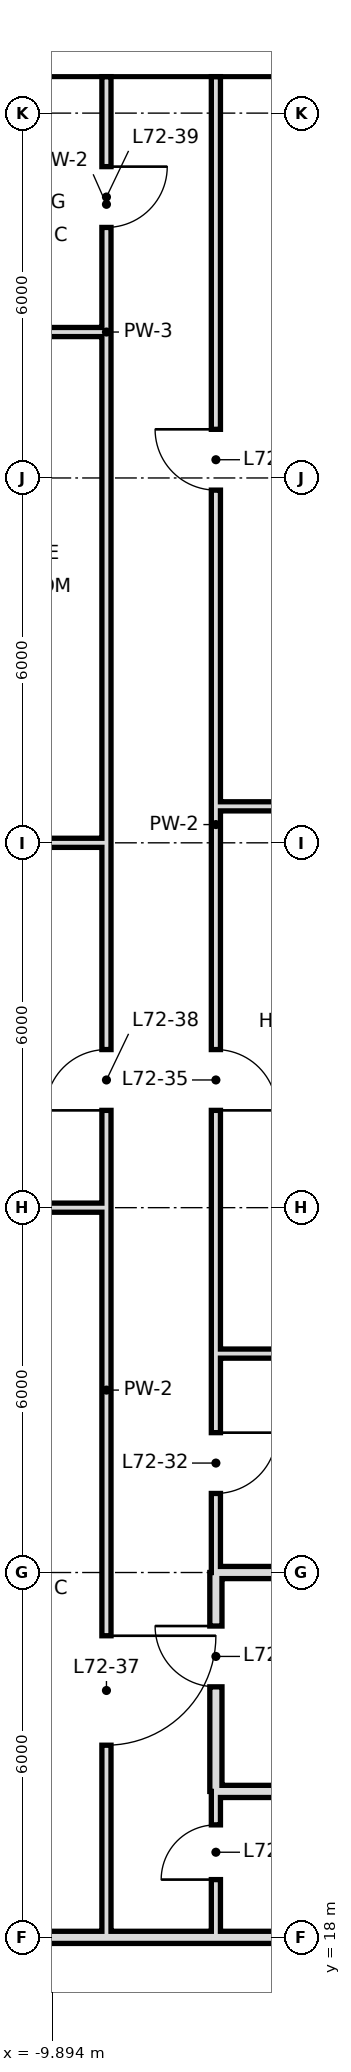
"""IFC4 building model, lengths in metres.
Left out: names, types, materials, properties, quantities, classifications, styles, units other than length and angle.
Written with IfcOpenShell. Run it as: python <this file> out.ifc"""

import sys

from ifc_helpers import new_model, si_unit, direction, frame, frame_2d, origin, place, context, subcontext, project, spatial, rectangle, extrude, element, fill, save


model = new_model("IFC4")
c1 = context("Model", 3, precision=1e-05, world=origin(), true_north=direction((0.0, 1.0)))
c2 = subcontext(c1, "Body", "Model", "MODEL_VIEW")
j1 = project(units=[si_unit("LENGTHUNIT", "METRE"), si_unit("PLANEANGLEUNIT", "RADIAN")], contexts=[c1])
p1 = place(None, origin())
s1 = spatial("IfcSite", under=j1, at=p1, CompositionType="ELEMENT")
p2 = place(p1, origin())
s2 = spatial("IfcBuilding", under=s1, at=p2, CompositionType="ELEMENT")
p3 = place(p2, frame((0.0, 0.0, 305.2)))
s3 = spatial("IfcBuildingStorey", under=s2, at=p3, CompositionType="ELEMENT", Elevation=305.2)
p4 = place(p3, frame((-7.2, 20.4, 0.0), z_axis=(0.0, 0.0, 1.0), x_axis=(0.0, 1.0, 0.0)))
e1 = element("IfcWall", 1, at=p4, inside=s3, PredefinedType="SOLIDWALL", context=c2, shape_type="SweptSolid", body=[
    extrude(rectangle(XDim=3.6, YDim=0.2, at=frame_2d((1.8, 0.0))), origin(), (0.0, 0.0, 1.0), 2.72),
])
p5 = place(p4, frame((1.72, 0.0, 0.0)))
e2 = element("IfcOpeningElement", 2, at=p5, cuts=e1, PredefinedType="OPENING", context=c2, shape_type="SweptSolid", body=[
    extrude(rectangle(XDim=1.0, YDim=2.4, at=frame_2d((0.5, 1.2))), frame((0.0, 0.11, 0.0), z_axis=(0.0, -1.0, 0.0), x_axis=(1.0, 0.0, 0.0)), (0.0, 0.0, 1.0), 0.22),
])
p6 = place(p3, frame((-7.2, 24.0, 0.0), z_axis=(0.0, 0.0, 1.0), x_axis=(0.0, 1.0, 0.0)))
e3 = element("IfcWall", 3, at=p6, inside=s3, PredefinedType="PARTITIONING", context=c2, shape_type="SweptSolid", body=[
    extrude(rectangle(XDim=24.6, YDim=0.15, at=frame_2d((12.3, 0.0))), origin(), (0.0, 0.0, 1.0), 3.42),
])
p7 = place(p6, frame((1.3, 0.0, 0.0)))
e4 = element("IfcOpeningElement", 4, at=p7, cuts=e3, PredefinedType="OPENING", context=c2, shape_type="SweptSolid", body=[
    extrude(rectangle(XDim=1.0, YDim=2.4, at=frame_2d((0.5, 1.2))), frame((0.0, 0.085, 0.0), z_axis=(0.0, -1.0, 0.0), x_axis=(1.0, 0.0, 0.0)), (0.0, 0.0, 1.0), 0.17),
])
p8 = place(p6, frame((7.6, 0.0, 0.0)))
e5 = element("IfcOpeningElement", 5, at=p8, cuts=e3, PredefinedType="OPENING", context=c2, shape_type="SweptSolid", body=[
    extrude(rectangle(XDim=1.0, YDim=2.4, at=frame_2d((0.5, 1.2))), frame((0.0, 0.085, 0.0), z_axis=(0.0, -1.0, 0.0), x_axis=(1.0, 0.0, 0.0)), (0.0, 0.0, 1.0), 0.17),
])
p9 = place(p6, frame((17.8, 0.0, 0.0)))
e6 = element("IfcOpeningElement", 6, at=p9, cuts=e3, PredefinedType="OPENING", context=c2, shape_type="SweptSolid", body=[
    extrude(rectangle(XDim=1.0, YDim=2.4, at=frame_2d((0.5, 1.2))), frame((0.0, 0.085, 0.0), z_axis=(0.0, -1.0, 0.0), x_axis=(1.0, 0.0, 0.0)), (0.0, 0.0, 1.0), 0.17),
])
p10 = place(p3, frame((-7.2, 18.0, 0.0), z_axis=(0.0, 0.0, 1.0), x_axis=(0.0, 1.0, 0.0)))
e7 = element("IfcWall", 7, at=p10, inside=s3, PredefinedType="PARTITIONING", context=c2, shape_type="SweptSolid", body=[
    extrude(rectangle(XDim=2.4, YDim=0.15, at=frame_2d((1.2, 0.0))), origin(), (0.0, 0.0, 1.0), 3.42),
])
p11 = place(p10, frame((0.95, 0.0, 0.0)))
e8 = element("IfcOpeningElement", 8, at=p11, cuts=e7, PredefinedType="OPENING", context=c2, shape_type="SweptSolid", body=[
    extrude(rectangle(XDim=0.9, YDim=2.4, at=frame_2d((0.45, 1.2))), frame((0.0, 0.085, 0.0), z_axis=(0.0, -1.0, 0.0), x_axis=(1.0, 0.0, 0.0)), (0.0, 0.0, 1.0), 0.17),
])
p12 = place(p3, frame((-9.0, 18.0, 0.0), z_axis=(0.0, 0.0, 1.0), x_axis=(0.0, 1.0, 0.0)))
e9 = element("IfcWall", 9, at=p12, inside=s3, PredefinedType="PARTITIONING", context=c2, shape_type="SweptSolid", body=[
    extrude(rectangle(XDim=18.0, YDim=0.15, at=frame_2d((9.0, 0.0))), origin(), (0.0, 0.0, 1.0), 3.42),
])
p13 = place(p12, frame((3.16, 0.0, 0.0)))
e10 = element("IfcOpeningElement", 10, at=p13, cuts=e9, PredefinedType="OPENING", context=c2, shape_type="SweptSolid", body=[
    extrude(rectangle(XDim=1.8, YDim=2.4, at=frame_2d((0.9, 1.2))), frame((0.0, 0.085, 0.0), z_axis=(0.0, -1.0, 0.0), x_axis=(1.0, 0.0, 0.0)), (0.0, 0.0, 1.0), 0.17),
])
p14 = place(p12, frame((13.6, 0.0, 0.0)))
e11 = element("IfcOpeningElement", 11, at=p14, cuts=e9, PredefinedType="OPENING", context=c2, shape_type="SweptSolid", body=[
    extrude(rectangle(XDim=1.0, YDim=2.4, at=frame_2d((0.5, 1.2))), frame((0.0, 0.085, 0.0), z_axis=(0.0, -1.0, 0.0), x_axis=(1.0, 0.0, 0.0)), (0.0, 0.0, 1.0), 0.17),
])
p15 = place(p3, frame((-9.0, 44.4, 0.0), z_axis=(0.0, 0.0, 1.0), x_axis=(0.0, 1.0, 0.0)))
e12 = element("IfcWall", 12, at=p15, inside=s3, PredefinedType="PARTITIONING", context=c2, shape_type="SweptSolid", body=[
    extrude(rectangle(XDim=4.2, YDim=0.15, at=frame_2d((2.1, 0.0))), origin(), (0.0, 0.0, 1.0), 3.42),
])
p16 = place(p15, frame((1.72, 0.0, 0.0)))
e13 = element("IfcOpeningElement", 13, at=p16, cuts=e12, PredefinedType="OPENING", context=c2, shape_type="SweptSolid", body=[
    extrude(rectangle(XDim=1.0, YDim=2.4, at=frame_2d((0.5, 1.2))), frame((0.0, 0.085, 0.0), z_axis=(0.0, -1.0, 0.0), x_axis=(1.0, 0.0, 0.0)), (0.0, 0.0, 1.0), 0.17),
])
p17 = place(p3, frame((-9.0, 36.0, 0.0), z_axis=(0.0, 0.0, 1.0), x_axis=(0.0, 1.0, 0.0)))
e14 = element("IfcWall", 14, at=p17, inside=s3, PredefinedType="PARTITIONING", context=c2, shape_type="SweptSolid", body=[
    extrude(rectangle(XDim=8.4, YDim=0.15, at=frame_2d((4.2, 0.0))), origin(), (0.0, 0.0, 1.0), 3.42),
])
p18 = place(p3, frame((-12.6, 18.0, 0.0), z_axis=(0.0, 0.0, 1.0), x_axis=(1.0, 0.0, 0.0)))
e15 = element("IfcWall", 15, at=p18, inside=s3, PredefinedType="SOLIDWALL", context=c2, shape_type="SweptSolid", body=[
    extrude(rectangle(XDim=15.7, YDim=0.2, at=frame_2d((7.85, 0.0))), origin(), (0.0, 0.0, 1.0), 2.72),
])
for number, where, z_axis, x_axis in (
    (16, (-7.2, 20.4, 0.0), (0.0, 0.0, 1.0), (1.0, 0.0, 0.0)),
    (17, (-7.2, 24.0, 0.0), (0.0, 0.0, 1.0), (1.0, 0.0, 0.0)),
):
    element("IfcWall", number, at=place(p3, frame(where, z_axis=z_axis, x_axis=x_axis)), inside=s3, PredefinedType="SOLIDWALL", context=c2, shape_type="SweptSolid", body=[
        extrude(rectangle(XDim=10.3, YDim=0.2, at=frame_2d((5.15, 0.0))), origin(), (0.0, 0.0, 1.0), 2.72),
    ])
p19 = place(p3, frame((-7.2, 27.6, 0.0), z_axis=(0.0, 0.0, 1.0), x_axis=(1.0, 0.0, 0.0)))
e18 = element("IfcWall", 18, at=p19, inside=s3, PredefinedType="PARTITIONING", context=c2, shape_type="SweptSolid", body=[
    extrude(rectangle(XDim=10.3, YDim=0.15, at=frame_2d((5.15, 0.0))), origin(), (0.0, 0.0, 1.0), 3.42),
])
p20 = place(p3, frame((-18.6, 30.0, 0.0), z_axis=(0.0, 0.0, 1.0), x_axis=(1.0, 0.0, 0.0)))
e19 = element("IfcWall", 19, at=p20, inside=s3, PredefinedType="PARTITIONING", context=c2, shape_type="SweptSolid", body=[
    extrude(rectangle(XDim=9.6, YDim=0.15, at=frame_2d((4.8, 0.0))), origin(), (0.0, 0.0, 1.0), 2.72),
])
p21 = place(p3, frame((-12.0, 36.0, 0.0), z_axis=(0.0, 0.0, 1.0), x_axis=(1.0, 0.0, 0.0)))
e20 = element("IfcWall", 20, at=p21, inside=s3, PredefinedType="PARTITIONING", context=c2, shape_type="SweptSolid", body=[
    extrude(rectangle(XDim=3.0, YDim=0.15, at=frame_2d((1.5, 0.0))), origin(), (0.0, 0.0, 1.0), 2.72),
])
p22 = place(p3, frame((-7.2, 36.6, 0.0), z_axis=(0.0, 0.0, 1.0), x_axis=(1.0, 0.0, 0.0)))
e21 = element("IfcWall", 21, at=p22, inside=s3, PredefinedType="PARTITIONING", context=c2, shape_type="SweptSolid", body=[
    extrude(rectangle(XDim=10.3, YDim=0.15, at=frame_2d((5.15, 0.0))), origin(), (0.0, 0.0, 1.0), 3.42),
])
p23 = place(p3, frame((-12.0, 44.4, 0.0), z_axis=(0.0, 0.0, 1.0), x_axis=(1.0, 0.0, 0.0)))
e22 = element("IfcWall", 22, at=p23, inside=s3, PredefinedType="PARTITIONING", context=c2, shape_type="SweptSolid", body=[
    extrude(rectangle(XDim=3.0, YDim=0.15, at=frame_2d((1.5, 0.0))), origin(), (0.0, 0.0, 1.0), 3.42),
])
p24 = place(p7, origin())
e23 = element("IfcDoor", 23, at=p24, inside=s3, OperationType="SINGLE_SWING_RIGHT", PredefinedType="DOOR", context=c2, shape_type="SweptSolid", body=[
    extrude(rectangle(XDim=1.0, YDim=2.4, at=frame_2d((0.5, 1.2))), frame((0.0, 0.025, 0.0), z_axis=(0.0, -1.0, 0.0), x_axis=(1.0, 0.0, 0.0)), (0.0, 0.0, 1.0), 0.05),
])
fill(e4, e23)
p25 = place(p11, origin())
e24 = element("IfcDoor", 24, at=p25, inside=s3, OperationType="SINGLE_SWING_LEFT", PredefinedType="DOOR", context=c2, shape_type="SweptSolid", body=[
    extrude(rectangle(XDim=0.9, YDim=2.4, at=frame_2d((0.45, 1.2))), frame((0.0, 0.025, 0.0), z_axis=(0.0, -1.0, 0.0), x_axis=(1.0, 0.0, 0.0)), (0.0, 0.0, 1.0), 0.05),
])
fill(e8, e24)
p26 = place(p5, frame((1.0, 0.0, 0.0), z_axis=(0.0, 0.0, 1.0), x_axis=(-1.0, 0.0, 0.0)))
e25 = element("IfcDoor", 25, at=p26, inside=s3, OperationType="SINGLE_SWING_LEFT", PredefinedType="DOOR", context=c2, shape_type="SweptSolid", body=[
    extrude(rectangle(XDim=1.0, YDim=2.4, at=frame_2d((0.5, 1.2))), frame((0.0, 0.025, 0.0), z_axis=(0.0, -1.0, 0.0), x_axis=(1.0, 0.0, 0.0)), (0.0, 0.0, 1.0), 0.05),
])
fill(e2, e25)
p27 = place(p8, frame((1.0, 0.0, 0.0), z_axis=(0.0, 0.0, 1.0), x_axis=(-1.0, 0.0, 0.0)))
e26 = element("IfcDoor", 26, at=p27, inside=s3, OperationType="SINGLE_SWING_RIGHT", PredefinedType="DOOR", context=c2, shape_type="SweptSolid", body=[
    extrude(rectangle(XDim=1.0, YDim=2.4, at=frame_2d((0.5, 1.2))), frame((0.0, 0.025, 0.0), z_axis=(0.0, -1.0, 0.0), x_axis=(1.0, 0.0, 0.0)), (0.0, 0.0, 1.0), 0.05),
])
fill(e5, e26)
p28 = place(p9, frame((1.0, 0.0, 0.0), z_axis=(0.0, 0.0, 1.0), x_axis=(-1.0, 0.0, 0.0)))
e27 = element("IfcDoor", 27, at=p28, inside=s3, OperationType="SINGLE_SWING_LEFT", PredefinedType="DOOR", context=c2, shape_type="SweptSolid", body=[
    extrude(rectangle(XDim=1.0, YDim=2.4, at=frame_2d((0.5, 1.2))), frame((0.0, 0.025, 0.0), z_axis=(0.0, -1.0, 0.0), x_axis=(1.0, 0.0, 0.0)), (0.0, 0.0, 1.0), 0.05),
])
fill(e6, e27)
p29 = place(p13, origin())
e28 = element("IfcDoor", 28, at=p29, inside=s3, OperationType="SINGLE_SWING_RIGHT", PredefinedType="DOOR", context=c2, shape_type="SweptSolid", body=[
    extrude(rectangle(XDim=1.8, YDim=2.4, at=frame_2d((0.9, 1.2))), frame((0.0, 0.025, 0.0), z_axis=(0.0, -1.0, 0.0), x_axis=(1.0, 0.0, 0.0)), (0.0, 0.0, 1.0), 0.05),
])
fill(e10, e28)
p30 = place(p14, origin())
e29 = element("IfcDoor", 29, at=p30, inside=s3, OperationType="SINGLE_SWING_LEFT", PredefinedType="DOOR", context=c2, shape_type="SweptSolid", body=[
    extrude(rectangle(XDim=1.0, YDim=2.4, at=frame_2d((0.5, 1.2))), frame((0.0, 0.025, 0.0), z_axis=(0.0, -1.0, 0.0), x_axis=(1.0, 0.0, 0.0)), (0.0, 0.0, 1.0), 0.05),
])
fill(e11, e29)
p31 = place(p16, origin())
e30 = element("IfcDoor", 30, at=p31, inside=s3, OperationType="SINGLE_SWING_RIGHT", PredefinedType="DOOR", context=c2, shape_type="SweptSolid", body=[
    extrude(rectangle(XDim=1.0, YDim=2.4, at=frame_2d((0.5, 1.2))), frame((0.0, 0.025, 0.0), z_axis=(0.0, -1.0, 0.0), x_axis=(1.0, 0.0, 0.0)), (0.0, 0.0, 1.0), 0.05),
])
fill(e13, e30)
save(model, sys.argv[1])
